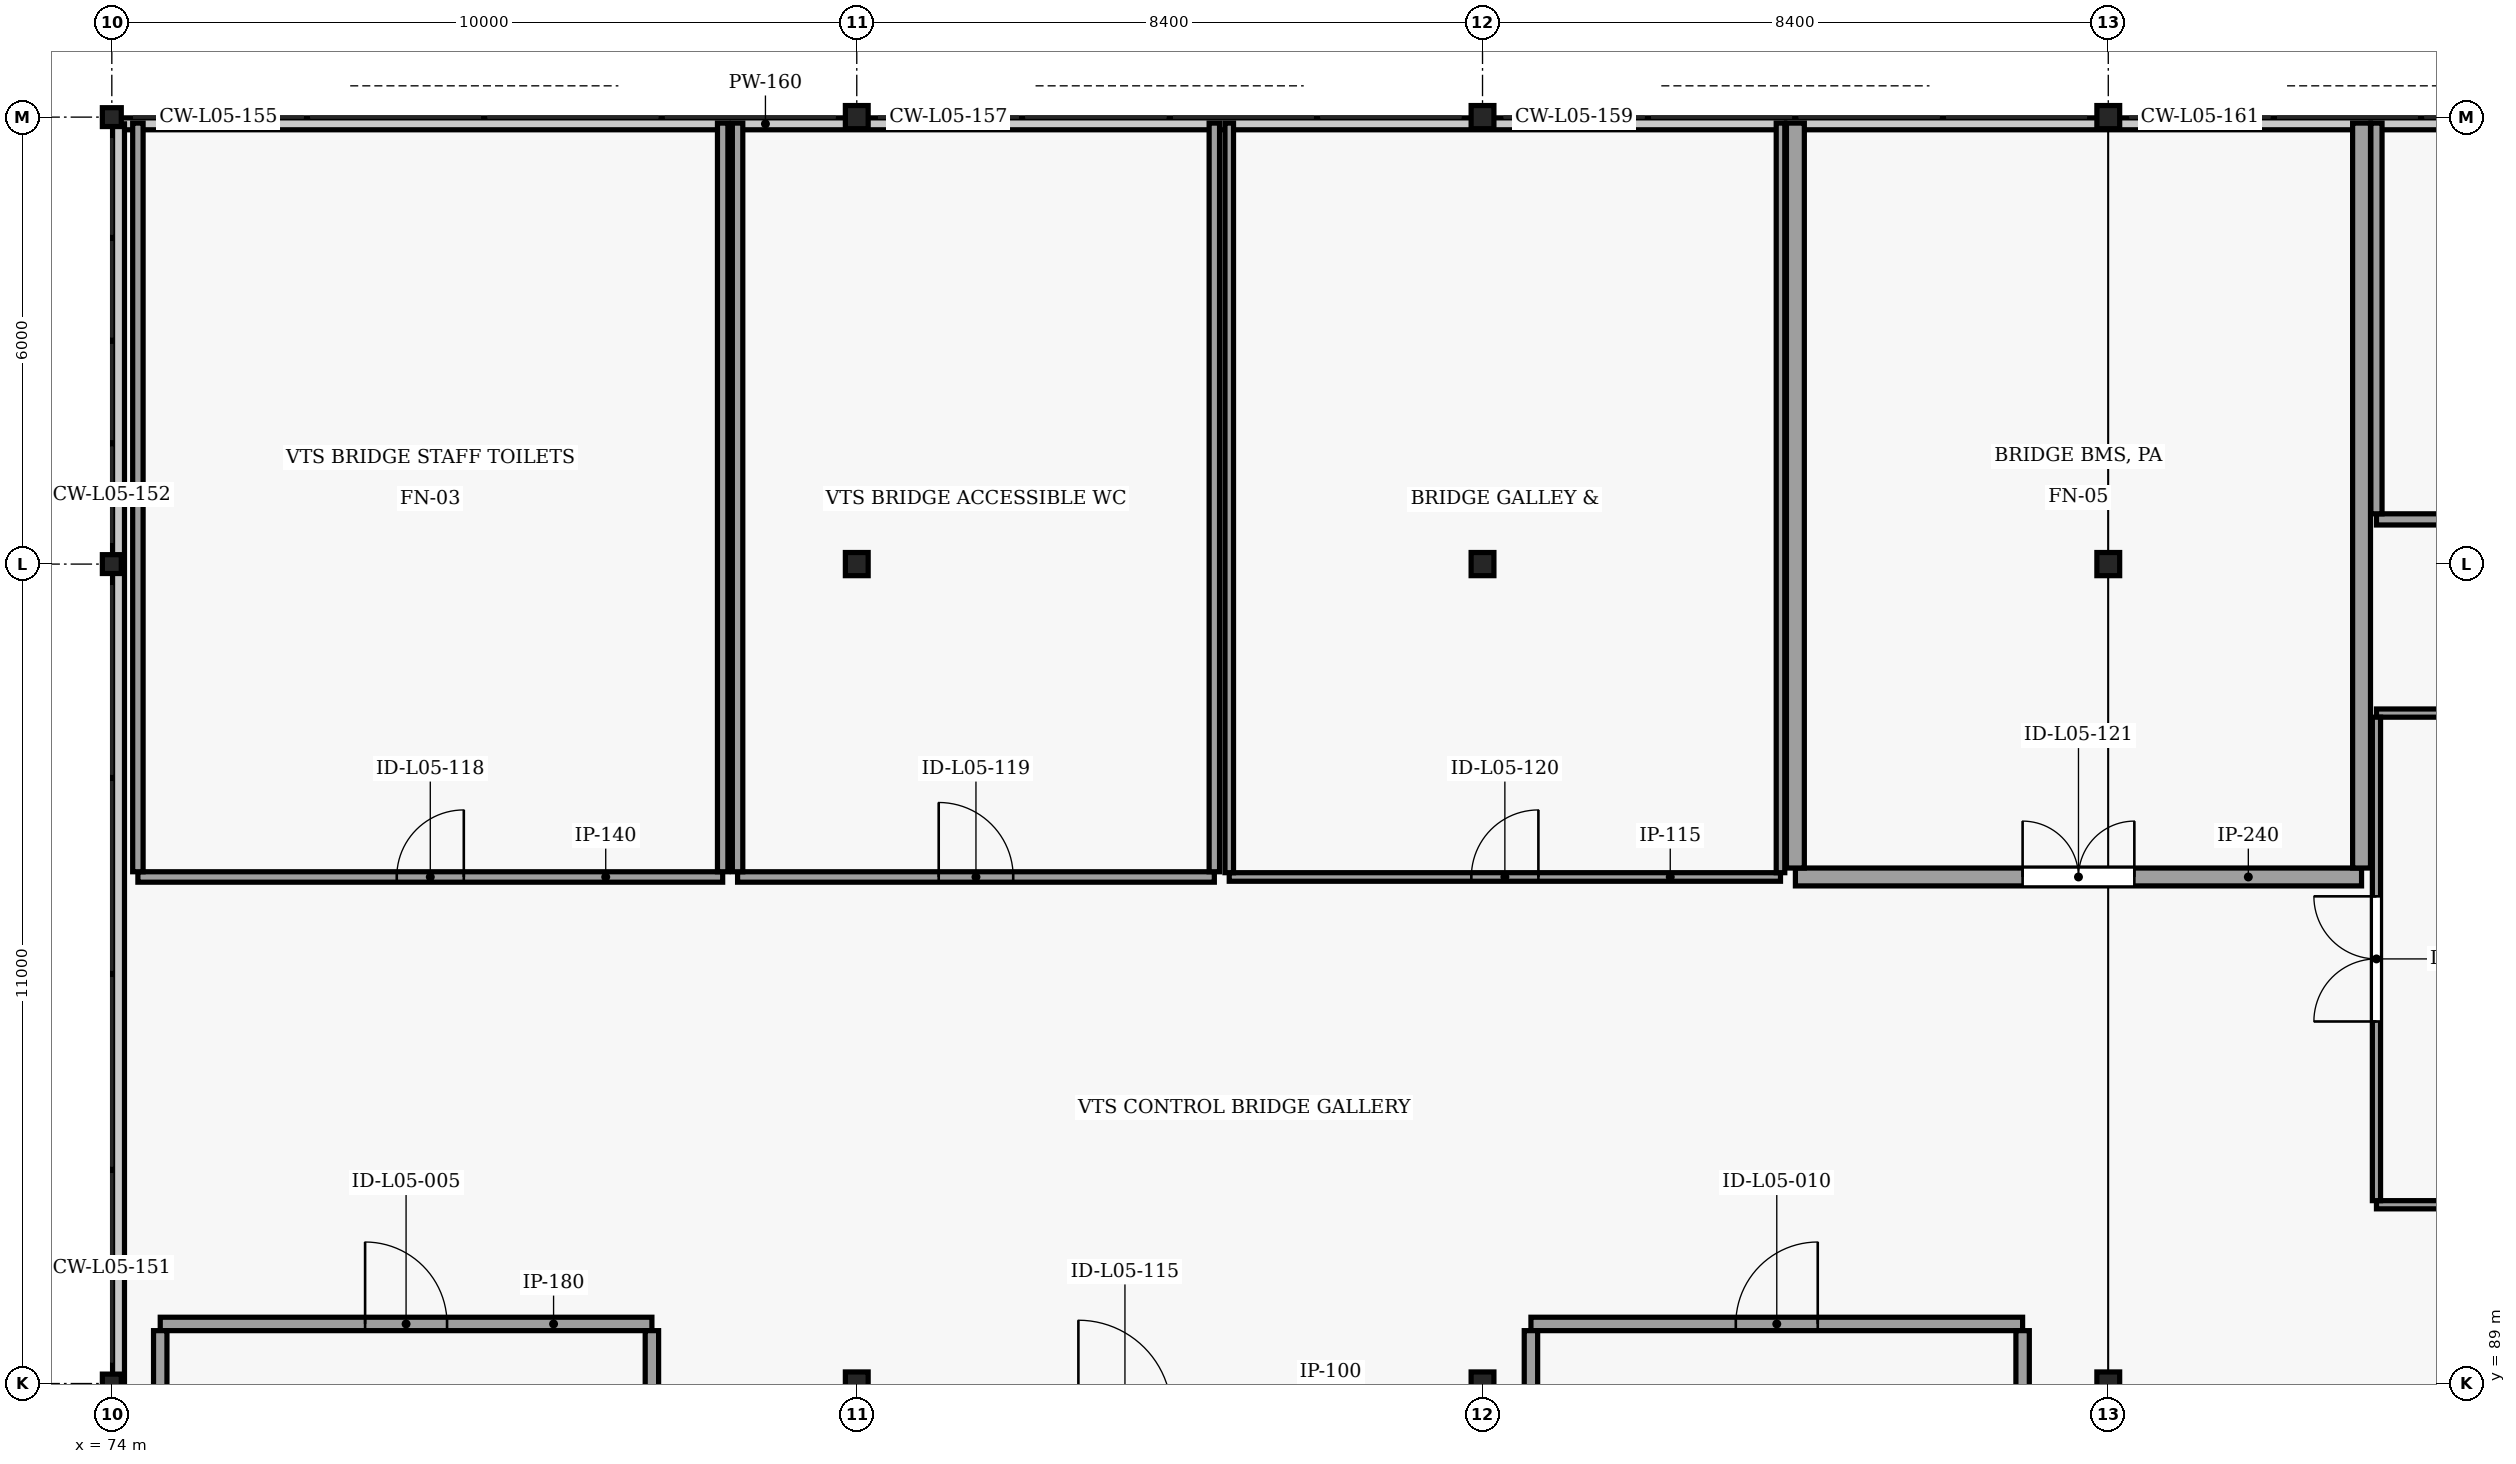
"""IFC4 building model, lengths in metres.
Left out: names, types, materials, properties, quantities, classifications, styles, units other than length and angle.
Written with IfcOpenShell. Run it as: python <this file> out.ifc"""

import sys

from ifc_helpers import new_model, si_unit, direction, frame, frame_2d, origin, origin_2d, place, context, subcontext, project, spatial, rectangle, i_section, extrude, element, fill, save


model = new_model("IFC4")
c1 = context("Model", 3, precision=1e-05, world=origin(), true_north=direction((0.0, 1.0)))
c2 = subcontext(c1, "Body", "Model", "MODEL_VIEW")
j1 = project(units=[si_unit("LENGTHUNIT", "METRE"), si_unit("PLANEANGLEUNIT", "RADIAN")], contexts=[c1])
p1 = place(None, origin())
s1 = spatial("IfcSite", under=j1, at=p1, CompositionType="ELEMENT")
p2 = place(p1, origin())
s2 = spatial("IfcBuilding", under=s1, at=p2, CompositionType="ELEMENT")
p3 = place(p2, frame((0.0, 0.0, 18.6)))
s3 = spatial("IfcBuildingStorey", under=s2, at=p3, CompositionType="ELEMENT", Elevation=18.6)
p4 = place(p3, frame((74.0, 89.0, 0.0), z_axis=(0.0, 0.0, 1.0), x_axis=(1.0, 0.0, 0.0)))
e1 = element("IfcColumn", 1, at=p4, inside=s3, PredefinedType="COLUMN", context=c2, shape_type="SweptSolid", body=[
    extrude(i_section(OverallWidth=0.254, OverallDepth=0.253, WebThickness=0.009, FlangeThickness=0.014, FilletRadius=0.012, at=origin_2d()), origin(), (0.0, 0.0, 1.0), 3.96),
])
for number, where, z_axis, x_axis in (
    (2, (84.0, 89.0, 0.0), (0.0, 0.0, 1.0), (1.0, 0.0, 0.0)),
    (3, (92.4, 89.0, 0.0), (0.0, 0.0, 1.0), (1.0, 0.0, 0.0)),
    (4, (100.8, 89.0, 0.0), (0.0, 0.0, 1.0), (1.0, 0.0, 0.0)),
):
    element("IfcColumn", number, at=place(p3, frame(where, z_axis=z_axis, x_axis=x_axis)), inside=s3, PredefinedType="COLUMN", context=c2, shape_type="SweptSolid", body=[
        extrude(i_section(OverallWidth=0.306, OverallDepth=0.311, WebThickness=0.011, FlangeThickness=0.017, FilletRadius=0.015, at=origin_2d()), origin(), (0.0, 0.0, 1.0), 3.96),
    ])
p5 = place(p3, frame((74.0, 100.0, 0.0), z_axis=(0.0, 0.0, 1.0), x_axis=(1.0, 0.0, 0.0)))
e5 = element("IfcColumn", 5, at=p5, inside=s3, PredefinedType="COLUMN", context=c2, shape_type="SweptSolid", body=[
    extrude(i_section(OverallWidth=0.254, OverallDepth=0.253, WebThickness=0.009, FlangeThickness=0.014, FilletRadius=0.012, at=origin_2d()), origin(), (0.0, 0.0, 1.0), 3.96),
])
for number, where, z_axis, x_axis in (
    (6, (84.0, 100.0, 0.0), (0.0, 0.0, 1.0), (1.0, 0.0, 0.0)),
    (7, (92.4, 100.0, 0.0), (0.0, 0.0, 1.0), (1.0, 0.0, 0.0)),
    (8, (100.8, 100.0, 0.0), (0.0, 0.0, 1.0), (1.0, 0.0, 0.0)),
):
    element("IfcColumn", number, at=place(p3, frame(where, z_axis=z_axis, x_axis=x_axis)), inside=s3, PredefinedType="COLUMN", context=c2, shape_type="SweptSolid", body=[
        extrude(i_section(OverallWidth=0.306, OverallDepth=0.311, WebThickness=0.011, FlangeThickness=0.017, FilletRadius=0.015, at=origin_2d()), origin(), (0.0, 0.0, 1.0), 3.96),
    ])
p6 = place(p3, frame((74.0, 106.0, 0.0), z_axis=(0.0, 0.0, 1.0), x_axis=(1.0, 0.0, 0.0)))
e9 = element("IfcColumn", 9, at=p6, inside=s3, PredefinedType="COLUMN", context=c2, shape_type="SweptSolid", body=[
    extrude(i_section(OverallWidth=0.254, OverallDepth=0.253, WebThickness=0.009, FlangeThickness=0.014, FilletRadius=0.012, at=origin_2d()), origin(), (0.0, 0.0, 1.0), 3.96),
])
for number, where, z_axis, x_axis in (
    (10, (84.0, 106.0, 0.0), (0.0, 0.0, 1.0), (1.0, 0.0, 0.0)),
    (11, (92.4, 106.0, 0.0), (0.0, 0.0, 1.0), (1.0, 0.0, 0.0)),
    (12, (100.8, 106.0, 0.0), (0.0, 0.0, 1.0), (1.0, 0.0, 0.0)),
):
    element("IfcColumn", number, at=place(p3, frame(where, z_axis=z_axis, x_axis=x_axis)), inside=s3, PredefinedType="COLUMN", context=c2, shape_type="SweptSolid", body=[
        extrude(i_section(OverallWidth=0.306, OverallDepth=0.311, WebThickness=0.011, FlangeThickness=0.017, FilletRadius=0.015, at=origin_2d()), origin(), (0.0, 0.0, 1.0), 3.96),
    ])
p7 = place(p3, frame((117.51, 105.91, 4.2), z_axis=(0.0, 0.0, 1.0), x_axis=(-1.0, 0.0, 0.0)))
e13 = element("IfcWall", 13, at=p7, inside=s3, PredefinedType="PARAPET", context=c2, shape_type="SweptSolid", body=[
    extrude(rectangle(XDim=43.42, YDim=0.16, at=frame_2d((21.71, 0.0))), origin(), (0.0, 0.0, 1.0), 1.2),
])
p8 = place(p3, frame((74.09, 105.91, 4.2), z_axis=(0.0, 0.0, 1.0), x_axis=(0.0, -1.0, 0.0)))
e14 = element("IfcWall", 14, at=p8, inside=s3, PredefinedType="PARAPET", context=c2, shape_type="SweptSolid", body=[
    extrude(rectangle(XDim=27.82, YDim=0.16, at=frame_2d((13.91, 0.0))), origin(), (0.0, 0.0, 1.0), 1.2),
])
p9 = place(p3, frame((74.65, 89.8, 0.0), z_axis=(0.0, 0.0, 1.0), x_axis=(1.0, 0.0, 0.0)))
e15 = element("IfcWall", 15, at=p9, inside=s3, PredefinedType="SOLIDWALL", context=c2, shape_type="SweptSolid", body=[
    extrude(rectangle(XDim=6.6, YDim=0.18, at=frame_2d((3.3, 0.0))), origin(), (0.0, 0.0, 1.0), 3.9),
])
p10 = place(p9, frame((2.75, 0.0, 0.0)))
e16 = element("IfcOpeningElement", 16, at=p10, cuts=e15, PredefinedType="OPENING", context=c2, shape_type="SweptSolid", body=[
    extrude(rectangle(XDim=1.1, YDim=2.2, at=frame_2d((0.55, 1.1))), frame((0.0, 0.1, 0.0), z_axis=(0.0, -1.0, 0.0), x_axis=(1.0, 0.0, 0.0)), (0.0, 0.0, 1.0), 0.2),
])
for number, where, z_axis, x_axis in (
    (17, (74.65, 87.2, 0.0), (0.0, 0.0, 1.0), (0.0, 1.0, 0.0)),
    (18, (81.25, 87.2, 0.0), (0.0, 0.0, 1.0), (0.0, 1.0, 0.0)),
):
    element("IfcWall", number, at=place(p3, frame(where, z_axis=z_axis, x_axis=x_axis)), inside=s3, PredefinedType="SOLIDWALL", context=c2, shape_type="SweptSolid", body=[
        extrude(rectangle(XDim=2.51, YDim=0.18, at=frame_2d((1.255, 0.0))), origin(), (0.0, 0.0, 1.0), 3.55),
    ])
p11 = place(p3, frame((93.05, 89.8, 0.0), z_axis=(0.0, 0.0, 1.0), x_axis=(1.0, 0.0, 0.0)))
e19 = element("IfcWall", 19, at=p11, inside=s3, PredefinedType="SOLIDWALL", context=c2, shape_type="SweptSolid", body=[
    extrude(rectangle(XDim=6.6, YDim=0.18, at=frame_2d((3.3, 0.0))), origin(), (0.0, 0.0, 1.0), 3.9),
])
p12 = place(p11, frame((2.75, 0.0, 0.0)))
e20 = element("IfcOpeningElement", 20, at=p12, cuts=e19, PredefinedType="OPENING", context=c2, shape_type="SweptSolid", body=[
    extrude(rectangle(XDim=1.1, YDim=2.2, at=frame_2d((0.55, 1.1))), frame((0.0, 0.1, 0.0), z_axis=(0.0, -1.0, 0.0), x_axis=(1.0, 0.0, 0.0)), (0.0, 0.0, 1.0), 0.2),
])
for number, where, z_axis, x_axis in (
    (21, (93.05, 87.2, 0.0), (0.0, 0.0, 1.0), (0.0, 1.0, 0.0)),
    (22, (99.65, 87.2, 0.0), (0.0, 0.0, 1.0), (0.0, 1.0, 0.0)),
):
    element("IfcWall", number, at=place(p3, frame(where, z_axis=z_axis, x_axis=x_axis)), inside=s3, PredefinedType="SOLIDWALL", context=c2, shape_type="SweptSolid", body=[
        extrude(rectangle(XDim=2.51, YDim=0.18, at=frame_2d((1.255, 0.0))), origin(), (0.0, 0.0, 1.0), 3.55),
    ])
for number, where, z_axis, x_axis in (
    (23, (104.4, 91.4, 0.0), (0.0, 0.0, 1.0), (1.0, 0.0, 0.0)),
    (24, (104.4, 98.0, 0.0), (0.0, 0.0, 1.0), (1.0, 0.0, 0.0)),
):
    element("IfcWall", number, at=place(p3, frame(where, z_axis=z_axis, x_axis=x_axis)), inside=s3, PredefinedType="MOVABLE", context=c2, shape_type="SweptSolid", body=[
        extrude(rectangle(XDim=13.12, YDim=0.11, at=frame_2d((6.56, 0.0))), origin(), (0.0, 0.0, 1.0), 3.604),
    ])
p13 = place(p3, frame((104.4, 91.455, 0.0), z_axis=(0.0, 0.0, 1.0), x_axis=(0.0, 1.0, 0.0)))
e25 = element("IfcWall", 25, at=p13, inside=s3, PredefinedType="MOVABLE", context=c2, shape_type="SweptSolid", body=[
    extrude(rectangle(XDim=6.49, YDim=0.11, at=frame_2d((3.245, 0.0))), origin(), (0.0, 0.0, 1.0), 3.698),
])
p14 = place(p13, frame((2.405, 0.0, 0.0)))
e26 = element("IfcOpeningElement", 26, at=p14, cuts=e25, PredefinedType="OPENING", context=c2, shape_type="SweptSolid", body=[
    extrude(rectangle(XDim=1.68, YDim=2.3, at=frame_2d((0.84, 1.15))), frame((0.0, 0.065, 0.0), z_axis=(0.0, -1.0, 0.0), x_axis=(1.0, 0.0, 0.0)), (0.0, 0.0, 1.0), 0.13),
])
p15 = place(p3, frame((74.35, 95.8, 0.0), z_axis=(0.0, 0.0, 1.0), x_axis=(1.0, 0.0, 0.0)))
e27 = element("IfcWall", 27, at=p15, inside=s3, PredefinedType="PARTITIONING", context=c2, shape_type="SweptSolid", body=[
    extrude(rectangle(XDim=7.85, YDim=0.14, at=frame_2d((3.925, 0.0))), origin(), (0.0, 0.0, 1.0), 3.9),
])
p16 = place(p15, frame((3.475, 0.0, 0.0)))
e28 = element("IfcOpeningElement", 28, at=p16, cuts=e27, PredefinedType="OPENING", context=c2, shape_type="SweptSolid", body=[
    extrude(rectangle(XDim=0.9, YDim=2.1, at=frame_2d((0.45, 1.05))), frame((0.0, 0.08, 0.0), z_axis=(0.0, -1.0, 0.0), x_axis=(1.0, 0.0, 0.0)), (0.0, 0.0, 1.0), 0.16),
])
for number, where, z_axis, x_axis in (
    (29, (74.35, 95.87, 0.0), (0.0, 0.0, 1.0), (0.0, 1.0, 0.0)),
    (30, (82.2, 95.87, 0.0), (0.0, 0.0, 1.0), (0.0, 1.0, 0.0)),
):
    element("IfcWall", number, at=place(p3, frame(where, z_axis=z_axis, x_axis=x_axis)), inside=s3, PredefinedType="PARTITIONING", context=c2, shape_type="SweptSolid", body=[
        extrude(rectangle(XDim=10.05, YDim=0.14, at=frame_2d((5.025, 0.0))), origin(), (0.0, 0.0, 1.0), 3.55),
    ])
p17 = place(p3, frame((82.4, 95.8, 0.0), z_axis=(0.0, 0.0, 1.0), x_axis=(1.0, 0.0, 0.0)))
e31 = element("IfcWall", 31, at=p17, inside=s3, PredefinedType="PARTITIONING", context=c2, shape_type="SweptSolid", body=[
    extrude(rectangle(XDim=6.4, YDim=0.14, at=frame_2d((3.2, 0.0))), origin(), (0.0, 0.0, 1.0), 3.604),
])
p18 = place(p17, frame((2.7, 0.0, 0.0)))
e32 = element("IfcOpeningElement", 32, at=p18, cuts=e31, PredefinedType="OPENING", context=c2, shape_type="SweptSolid", body=[
    extrude(rectangle(XDim=1.0, YDim=2.15, at=frame_2d((0.5, 1.075))), frame((0.0, 0.08, 0.0), z_axis=(0.0, -1.0, 0.0), x_axis=(1.0, 0.0, 0.0)), (0.0, 0.0, 1.0), 0.16),
])
for number, where, z_axis, x_axis in (
    (33, (82.4, 95.87, 0.0), (0.0, 0.0, 1.0), (0.0, 1.0, 0.0)),
    (34, (88.8, 95.87, 0.0), (0.0, 0.0, 1.0), (0.0, 1.0, 0.0)),
):
    element("IfcWall", number, at=place(p3, frame(where, z_axis=z_axis, x_axis=x_axis)), inside=s3, PredefinedType="PARTITIONING", context=c2, shape_type="SweptSolid", body=[
        extrude(rectangle(XDim=10.05, YDim=0.14, at=frame_2d((5.025, 0.0))), origin(), (0.0, 0.0, 1.0), 3.55),
    ])
p19 = place(p3, frame((89.0, 95.8, 0.0), z_axis=(0.0, 0.0, 1.0), x_axis=(1.0, 0.0, 0.0)))
e35 = element("IfcWall", 35, at=p19, inside=s3, PredefinedType="PARTITIONING", context=c2, shape_type="SweptSolid", body=[
    extrude(rectangle(XDim=7.4, YDim=0.115, at=frame_2d((3.7, 0.0))), origin(), (0.0, 0.0, 1.0), 3.604),
])
p20 = place(p19, frame((3.25, 0.0, 0.0)))
e36 = element("IfcOpeningElement", 36, at=p20, cuts=e35, PredefinedType="OPENING", context=c2, shape_type="SweptSolid", body=[
    extrude(rectangle(XDim=0.9, YDim=2.15, at=frame_2d((0.45, 1.075))), frame((0.0, 0.067, 0.0), z_axis=(0.0, -1.0, 0.0), x_axis=(1.0, 0.0, 0.0)), (0.0, 0.0, 1.0), 0.135),
])
for number, where, z_axis, x_axis in (
    (37, (89.0, 95.857, 0.0), (0.0, 0.0, 1.0), (0.0, 1.0, 0.0)),
    (38, (96.4, 95.857, 0.0), (0.0, 0.0, 1.0), (0.0, 1.0, 0.0)),
):
    element("IfcWall", number, at=place(p3, frame(where, z_axis=z_axis, x_axis=x_axis)), inside=s3, PredefinedType="PARTITIONING", context=c2, shape_type="SweptSolid", body=[
        extrude(rectangle(XDim=10.062, YDim=0.115, at=frame_2d((5.031, 0.0))), origin(), (0.0, 0.0, 1.0), 3.55),
    ])
p21 = place(p3, frame((96.6, 95.8, 0.0), z_axis=(0.0, 0.0, 1.0), x_axis=(1.0, 0.0, 0.0)))
e39 = element("IfcWall", 39, at=p21, inside=s3, PredefinedType="SOLIDWALL", context=c2, shape_type="SweptSolid", body=[
    extrude(rectangle(XDim=7.6, YDim=0.24, at=frame_2d((3.8, 0.0))), origin(), (0.0, 0.0, 1.0), 3.604),
])
p22 = place(p21, frame((3.05, 0.0, 0.0)))
e40 = element("IfcOpeningElement", 40, at=p22, cuts=e39, PredefinedType="OPENING", context=c2, shape_type="SweptSolid", body=[
    extrude(rectangle(XDim=1.5, YDim=2.25, at=frame_2d((0.75, 1.125))), frame((0.0, 0.13, 0.0), z_axis=(0.0, -1.0, 0.0), x_axis=(1.0, 0.0, 0.0)), (0.0, 0.0, 1.0), 0.26),
])
for number, where, z_axis, x_axis in (
    (41, (96.6, 95.92, 0.0), (0.0, 0.0, 1.0), (0.0, 1.0, 0.0)),
    (42, (104.2, 95.92, 0.0), (0.0, 0.0, 1.0), (0.0, 1.0, 0.0)),
):
    element("IfcWall", number, at=place(p3, frame(where, z_axis=z_axis, x_axis=x_axis)), inside=s3, PredefinedType="SOLIDWALL", context=c2, shape_type="SweptSolid", body=[
        extrude(rectangle(XDim=10.0, YDim=0.24, at=frame_2d((5.0, 0.0))), origin(), (0.0, 0.0, 1.0), 3.55),
    ])
p23 = place(p3, frame((104.4, 100.6, 0.0), z_axis=(0.0, 0.0, 1.0), x_axis=(1.0, 0.0, 0.0)))
e43 = element("IfcWall", 43, at=p23, inside=s3, PredefinedType="PARTITIONING", context=c2, shape_type="SweptSolid", body=[
    extrude(rectangle(XDim=13.12, YDim=0.15, at=frame_2d((6.56, 0.0))), origin(), (0.0, 0.0, 1.0), 3.604),
])
p24 = place(p23, frame((2.2, 0.0, 0.0)))
e44 = element("IfcOpeningElement", 44, at=p24, cuts=e43, PredefinedType="OPENING", context=c2, shape_type="SweptSolid", body=[
    extrude(rectangle(XDim=1.6, YDim=2.2, at=frame_2d((0.8, 1.1))), frame((0.0, 0.085, 0.0), z_axis=(0.0, -1.0, 0.0), x_axis=(1.0, 0.0, 0.0)), (0.0, 0.0, 1.0), 0.17),
])
p25 = place(p3, frame((104.4, 100.675, 0.0), z_axis=(0.0, 0.0, 1.0), x_axis=(0.0, 1.0, 0.0)))
e45 = element("IfcWall", 45, at=p25, inside=s3, PredefinedType="PARTITIONING", context=c2, shape_type="SweptSolid", body=[
    extrude(rectangle(XDim=5.245, YDim=0.15, at=frame_2d((2.623, 0.0))), origin(), (0.0, 0.0, 1.0), 3.698),
])
p26 = place(p10, origin())
e46 = element("IfcDoor", 46, at=p26, inside=s3, OperationType="SINGLE_SWING_LEFT", PredefinedType="DOOR", context=c2, shape_type="SweptSolid", body=[
    extrude(rectangle(XDim=1.1, YDim=2.2, at=frame_2d((0.55, 1.1))), frame((0.0, 0.025, 0.0), z_axis=(0.0, -1.0, 0.0), x_axis=(1.0, 0.0, 0.0)), (0.0, 0.0, 1.0), 0.05),
])
fill(e16, e46)
p27 = place(p12, origin())
e47 = element("IfcDoor", 47, at=p27, inside=s3, OperationType="SINGLE_SWING_RIGHT", PredefinedType="DOOR", context=c2, shape_type="SweptSolid", body=[
    extrude(rectangle(XDim=1.1, YDim=2.2, at=frame_2d((0.55, 1.1))), frame((0.0, 0.025, 0.0), z_axis=(0.0, -1.0, 0.0), x_axis=(1.0, 0.0, 0.0)), (0.0, 0.0, 1.0), 0.05),
])
fill(e20, e47)
p28 = place(p14, origin())
e48 = element("IfcDoor", 48, at=p28, inside=s3, OperationType="DOUBLE_DOOR_SINGLE_SWING", PredefinedType="DOOR", context=c2, shape_type="SweptSolid", body=[
    extrude(rectangle(XDim=1.68, YDim=2.3, at=frame_2d((0.84, 1.15))), frame((0.0, 0.025, 0.0), z_axis=(0.0, -1.0, 0.0), x_axis=(1.0, 0.0, 0.0)), (0.0, 0.0, 1.0), 0.05),
])
fill(e26, e48)
p29 = place(p16, origin())
e49 = element("IfcDoor", 49, at=p29, inside=s3, OperationType="SINGLE_SWING_RIGHT", PredefinedType="DOOR", context=c2, shape_type="SweptSolid", body=[
    extrude(rectangle(XDim=0.9, YDim=2.1, at=frame_2d((0.45, 1.05))), frame((0.0, 0.025, 0.0), z_axis=(0.0, -1.0, 0.0), x_axis=(1.0, 0.0, 0.0)), (0.0, 0.0, 1.0), 0.05),
])
fill(e28, e49)
p30 = place(p18, origin())
e50 = element("IfcDoor", 50, at=p30, inside=s3, OperationType="SINGLE_SWING_LEFT", PredefinedType="DOOR", context=c2, shape_type="SweptSolid", body=[
    extrude(rectangle(XDim=1.0, YDim=2.15, at=frame_2d((0.5, 1.075))), frame((0.0, 0.025, 0.0), z_axis=(0.0, -1.0, 0.0), x_axis=(1.0, 0.0, 0.0)), (0.0, 0.0, 1.0), 0.05),
])
fill(e32, e50)
p31 = place(p20, origin())
e51 = element("IfcDoor", 51, at=p31, inside=s3, OperationType="SINGLE_SWING_RIGHT", PredefinedType="DOOR", context=c2, shape_type="SweptSolid", body=[
    extrude(rectangle(XDim=0.9, YDim=2.15, at=frame_2d((0.45, 1.075))), frame((0.0, 0.025, 0.0), z_axis=(0.0, -1.0, 0.0), x_axis=(1.0, 0.0, 0.0)), (0.0, 0.0, 1.0), 0.05),
])
fill(e36, e51)
p32 = place(p22, origin())
e52 = element("IfcDoor", 52, at=p32, inside=s3, OperationType="DOUBLE_DOOR_SINGLE_SWING", PredefinedType="DOOR", context=c2, shape_type="SweptSolid", body=[
    extrude(rectangle(XDim=1.5, YDim=2.25, at=frame_2d((0.75, 1.125))), frame((0.0, 0.025, 0.0), z_axis=(0.0, -1.0, 0.0), x_axis=(1.0, 0.0, 0.0)), (0.0, 0.0, 1.0), 0.05),
])
fill(e40, e52)
save(model, sys.argv[1])
